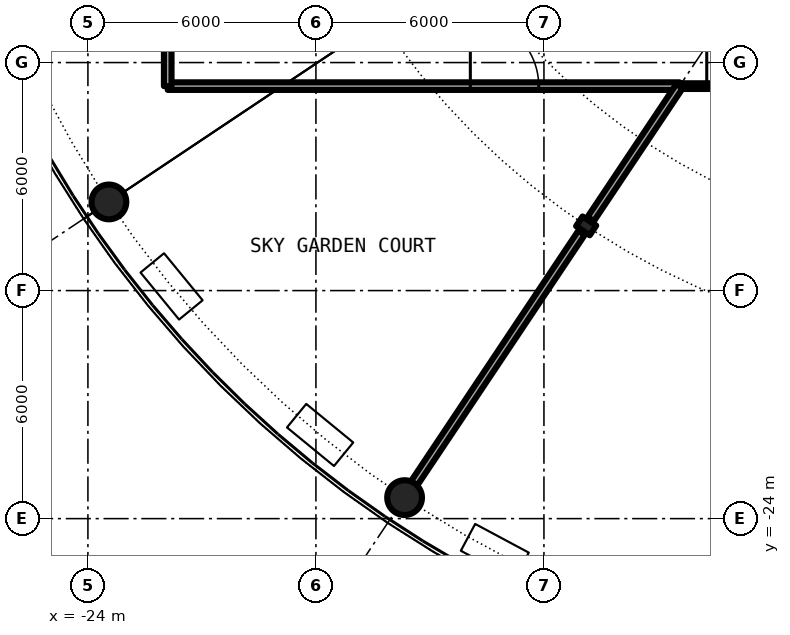
"""IFC4 building model, lengths in metres.
Left out: names, types, materials, properties, quantities, classifications, styles, units other than length and angle.
Written with IfcOpenShell. Run it as: python <this file> out.ifc"""

import sys

from ifc_helpers import new_model, si_unit, direction, frame, frame_2d, origin, origin_2d, place, context, subcontext, project, spatial, rectangle, hollow_circle, i_section, extrude, element, fill, save


model = new_model("IFC4")
c1 = context("Model", 3, precision=1e-05, world=origin(), true_north=direction((0.0, 1.0)))
c2 = subcontext(c1, "Body", "Model", "MODEL_VIEW")
j1 = project(units=[si_unit("LENGTHUNIT", "METRE"), si_unit("PLANEANGLEUNIT", "RADIAN")], contexts=[c1])
p1 = place(None, origin())
s1 = spatial("IfcSite", under=j1, at=p1, CompositionType="ELEMENT")
p2 = place(p1, origin())
s2 = spatial("IfcBuilding", under=s1, at=p2, CompositionType="ELEMENT")
p3 = place(p2, frame((0.0, 0.0, 139.1)))
s3 = spatial("IfcBuildingStorey", under=s2, at=p3, CompositionType="ELEMENT", Elevation=139.1)
for number, where, z_axis, x_axis in (
    (1, (-23.448, -15.667, 0.0), (0.0, 0.0, 1.0), (1.0, 0.0, 0.0)),
    (2, (-15.667, -23.448, 0.0), (0.0, 0.0, 1.0), (1.0, 0.0, 0.0)),
):
    element("IfcColumn", number, at=place(p3, frame(where, z_axis=z_axis, x_axis=x_axis)), inside=s3, PredefinedType="COLUMN", context=c2, shape_type="SweptSolid", body=[
        extrude(hollow_circle(Radius=0.457, WallThickness=0.04, at=origin_2d()), origin(), (0.0, 0.0, 1.0), 6.1),
    ])
p4 = place(p3, frame((-10.889, -16.297, 0.0), z_axis=(0.0, 0.0, 1.0), x_axis=(-0.55557023302, -0.831469612303, 0.0)))
e3 = element("IfcColumn", 3, at=p4, inside=s3, PredefinedType="COLUMN", context=c2, shape_type="SweptSolid", body=[
    extrude(i_section(OverallWidth=0.307, OverallDepth=0.432, WebThickness=0.021, FlangeThickness=0.04, FilletRadius=0.027, at=origin_2d()), origin(), (0.0, 0.0, 1.0), 6.1),
])
p5 = place(p3, frame((-21.9, -12.62, 0.0), z_axis=(0.0, 0.0, 1.0), x_axis=(1.0, 0.0, 0.0)))
e4 = element("IfcWall", 4, at=p5, inside=s3, PredefinedType="PARTITIONING", context=c2, shape_type="SweptSolid", body=[
    extrude(rectangle(XDim=13.468, YDim=0.2, at=frame_2d((6.734, 0.0))), origin(), (0.0, 0.0, 1.0), 5.75),
])
p6 = place(p5, frame((7.963, 0.0, 0.0)))
e5 = element("IfcOpeningElement", 5, at=p6, cuts=e4, PredefinedType="OPENING", context=c2, shape_type="SweptSolid", body=[
    extrude(rectangle(XDim=1.8, YDim=2.3, at=frame_2d((0.9, 1.15))), frame((0.0, 0.11, 0.0), z_axis=(0.0, -1.0, 0.0), x_axis=(1.0, 0.0, 0.0)), (0.0, 0.0, 1.0), 0.22),
])
p7 = place(p3, frame((-8.432, -12.62, 0.0), z_axis=(0.0, 0.0, 1.0), x_axis=(1.0, 0.0, 0.0)))
e6 = element("IfcWall", 6, at=p7, inside=s3, PredefinedType="PARTITIONING", context=c2, shape_type="SweptSolid", body=[
    extrude(rectangle(XDim=2.432, YDim=0.15, at=frame_2d((1.216, 0.0))), origin(), (0.0, 0.0, 1.0), 5.75),
])
p8 = place(p7, frame((0.716, 0.0, 0.0)))
e7 = element("IfcOpeningElement", 7, at=p8, cuts=e6, PredefinedType="OPENING", context=c2, shape_type="SweptSolid", body=[
    extrude(rectangle(XDim=1.0, YDim=2.3, at=frame_2d((0.5, 1.15))), frame((0.0, 0.085, 0.0), z_axis=(0.0, -1.0, 0.0), x_axis=(1.0, 0.0, 0.0)), (0.0, 0.0, 1.0), 0.17),
])
p9 = place(p3, frame((-15.418, -23.075, 0.0), z_axis=(0.0, 0.0, 1.0), x_axis=(0.555601548305, 0.831448687245, 0.0)))
e8 = element("IfcWall", 8, at=p9, inside=s3, PredefinedType="PARTITIONING", context=c2, shape_type="SweptSolid", body=[
    extrude(rectangle(XDim=7.936, YDim=0.2, at=frame_2d((3.968, 0.0))), origin(), (0.0, 0.0, 1.0), 5.75),
])
p10 = place(p3, frame((-10.769, -16.117, 0.0), z_axis=(0.0, 0.0, 1.0), x_axis=(0.555677670829, 0.831397814612, 0.0)))
e9 = element("IfcWall", 9, at=p10, inside=s3, PredefinedType="PARTITIONING", context=c2, shape_type="SweptSolid", body=[
    extrude(rectangle(XDim=4.206, YDim=0.2, at=frame_2d((2.103, 0.0))), origin(), (0.0, 0.0, 1.0), 5.75),
])
p11 = place(p3, frame((-21.9, -12.62, 0.0), z_axis=(0.0, 0.0, 1.0), x_axis=(0.0, 1.0, 0.0)))
e10 = element("IfcWall", 10, at=p11, inside=s3, PredefinedType="PARTITIONING", context=c2, shape_type="SweptSolid", body=[
    extrude(rectangle(XDim=3.4, YDim=0.2, at=frame_2d((1.7, 0.0))), origin(), (0.0, 0.0, 1.0), 5.75),
])
p12 = place(p8, origin())
e11 = element("IfcDoor", 11, at=p12, inside=s3, OperationType="SINGLE_SWING_LEFT", PredefinedType="DOOR", context=c2, shape_type="SweptSolid", body=[
    extrude(rectangle(XDim=1.0, YDim=2.3, at=frame_2d((0.5, 1.15))), frame((0.0, 0.025, 0.0), z_axis=(0.0, -1.0, 0.0), x_axis=(1.0, 0.0, 0.0)), (0.0, 0.0, 1.0), 0.05),
])
fill(e7, e11)
p13 = place(p6, origin())
e12 = element("IfcDoor", 12, at=p13, inside=s3, OperationType="DOUBLE_DOOR_SINGLE_SWING", PredefinedType="DOOR", context=c2, shape_type="SweptSolid", body=[
    extrude(rectangle(XDim=1.8, YDim=2.3, at=frame_2d((0.9, 1.15))), frame((0.0, 0.025, 0.0), z_axis=(0.0, -1.0, 0.0), x_axis=(1.0, 0.0, 0.0)), (0.0, 0.0, 1.0), 0.05),
])
fill(e5, e12)
save(model, sys.argv[1])
